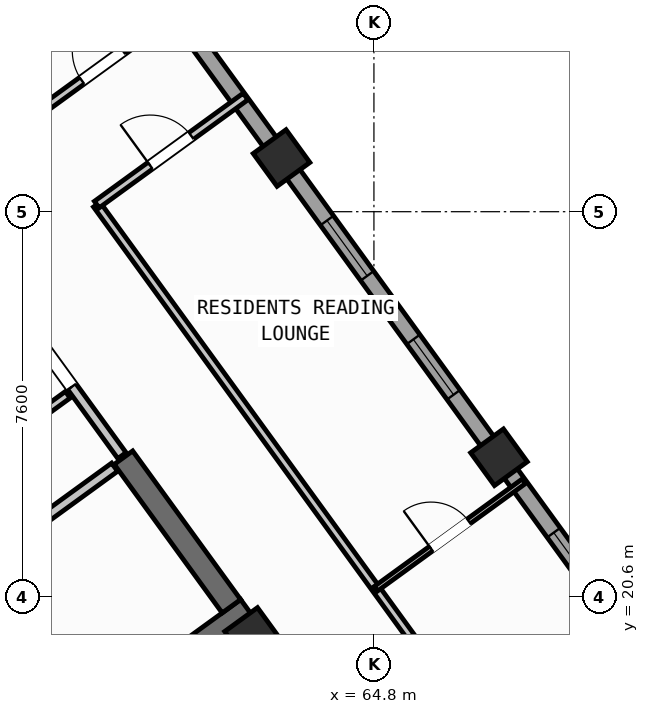
"""IFC4 building model, lengths in metres.
Left out: names, types, materials, properties, quantities, classifications, styles, units other than length and angle.
Written with IfcOpenShell. Run it as: python <this file> out.ifc"""

import sys

from ifc_helpers import new_model, si_unit, direction, frame, frame_2d, origin, origin_2d, place, context, subcontext, project, spatial, rectangle, hollow_rectangle, extrude, source, transform, mapped, element, fill, save


model = new_model("IFC4")
c1 = context("Model", 3, precision=1e-05, world=origin(), true_north=direction((0.0, 1.0)))
c2 = subcontext(c1, "Body", "Model", "MODEL_VIEW")
j1 = project(units=[si_unit("LENGTHUNIT", "METRE"), si_unit("PLANEANGLEUNIT", "RADIAN")], contexts=[c1])
p1 = place(None, origin())
s1 = spatial("IfcSite", under=j1, at=p1, CompositionType="ELEMENT")
p2 = place(p1, origin())
s2 = spatial("IfcBuilding", under=s1, at=p2, CompositionType="ELEMENT")
p3 = place(p2, frame((0.0, 0.0, 238.5)))
s3 = spatial("IfcBuildingStorey", under=s2, at=p3, CompositionType="ELEMENT", Elevation=238.5)
p4 = place(p3, frame((52.399, 13.169, 0.0), z_axis=(0.0, 0.0, 1.0), x_axis=(0.809022352778, 0.587777877013, 0.0)))
e1 = element("IfcWall", 1, at=p4, inside=s3, PredefinedType="SHEAR", context=c2, shape_type="SweptSolid", body=[
    extrude(rectangle(XDim=12.24, YDim=0.45, at=frame_2d((6.12, 0.0))), origin(), (0.0, 0.0, 1.0), 3.35),
])
p5 = place(p3, frame((61.988, 20.413, 0.0), z_axis=(0.0, 0.0, 1.0), x_axis=(-0.587819244441, 0.808992296542, 0.0)))
e2 = element("IfcWall", 2, at=p5, inside=s3, PredefinedType="SHEAR", context=c2, shape_type="SweptSolid", body=[
    extrude(rectangle(XDim=3.625, YDim=0.45, at=frame_2d((1.812, 0.0))), origin(), (0.0, 0.0, 1.0), 3.35),
])
m1 = source(origin(), c2, "Body", "SweptSolid", [
    extrude(hollow_rectangle(XDim=0.8, YDim=0.8, WallThickness=0.032, at=origin_2d()), origin(), (0.0, 0.0, 1.0), 3.6),
])
for number, where, z_axis, x_axis in (
    (3, (62.414, 19.827, 0.0), (0.0, 0.0, 1.0), (0.809, 0.588, 0.0)),
    (4, (67.268, 23.354, 0.0), (0.0, 0.0, 1.0), (0.809, 0.588, 0.0)),
    (5, (62.977, 29.259, 0.0), (0.0, 0.0, 1.0), (0.809, 0.588, 0.0)),
):
    element("IfcColumn", number, at=place(p3, frame(where, z_axis=z_axis, x_axis=x_axis)), inside=s3, PredefinedType="COLUMN", context=c2, shape_type="MappedRepresentation", body=[
        mapped(m1, transform((0.0, 0.0, 0.0), scale=1.0)),
    ])
p6 = place(p3, frame((58.455, 35.484, 0.0), z_axis=(0.0, 0.0, 1.0), x_axis=(0.587783625747, -0.809018176127, 0.0)))
e6 = element("IfcWall", 6, at=p6, inside=s3, PredefinedType="STANDARD", context=c2, shape_type="SweptSolid", body=[
    extrude(rectangle(XDim=21.587, YDim=0.32, at=frame_2d((10.794, 0.0))), origin(), (0.0, 0.0, 1.0), 2.875),
])
p7 = place(p6, frame((1.554, 0.0, 0.9)))
e7 = element("IfcOpeningElement", 7, at=p7, cuts=e6, PredefinedType="OPENING", context=c2, shape_type="SweptSolid", body=[
    extrude(rectangle(XDim=1.65, YDim=1.45, at=frame_2d((0.825, 0.725))), frame((0.0, 0.17, 0.0), z_axis=(0.0, -1.0, 0.0), x_axis=(1.0, 0.0, 0.0)), (0.0, 0.0, 1.0), 0.34),
])
p8 = place(p6, frame((9.219, 0.0, 0.9)))
e8 = element("IfcOpeningElement", 8, at=p8, cuts=e6, PredefinedType="OPENING", context=c2, shape_type="SweptSolid", body=[
    extrude(rectangle(XDim=1.35, YDim=1.45, at=frame_2d((0.675, 0.725))), frame((0.0, 0.17, 0.0), z_axis=(0.0, -1.0, 0.0), x_axis=(1.0, 0.0, 0.0)), (0.0, 0.0, 1.0), 0.34),
])
p9 = place(p6, frame((12.119, 0.0, 0.9)))
e9 = element("IfcOpeningElement", 9, at=p9, cuts=e6, PredefinedType="OPENING", context=c2, shape_type="SweptSolid", body=[
    extrude(rectangle(XDim=1.35, YDim=1.45, at=frame_2d((0.675, 0.725))), frame((0.0, 0.17, 0.0), z_axis=(0.0, -1.0, 0.0), x_axis=(1.0, 0.0, 0.0)), (0.0, 0.0, 1.0), 0.34),
])
p10 = place(p6, frame((16.833, 0.0, 1.0)))
e10 = element("IfcOpeningElement", 10, at=p10, cuts=e6, PredefinedType="OPENING", context=c2, shape_type="SweptSolid", body=[
    extrude(rectangle(XDim=0.9, YDim=1.25, at=frame_2d((0.45, 0.625))), frame((0.0, 0.17, 0.0), z_axis=(0.0, -1.0, 0.0), x_axis=(1.0, 0.0, 0.0)), (0.0, 0.0, 1.0), 0.34),
])
p11 = place(p6, frame((19.057, 0.0, 1.0)))
e11 = element("IfcOpeningElement", 11, at=p11, cuts=e6, PredefinedType="OPENING", context=c2, shape_type="SweptSolid", body=[
    extrude(rectangle(XDim=0.9, YDim=1.25, at=frame_2d((0.45, 0.625))), frame((0.0, 0.17, 0.0), z_axis=(0.0, -1.0, 0.0), x_axis=(1.0, 0.0, 0.0)), (0.0, 0.0, 1.0), 0.34),
])
p12 = place(p3, frame((58.41, 18.327, 0.0), z_axis=(0.0, 0.0, 1.0), x_axis=(-0.58776738483, 0.809029975545, 0.0)))
e12 = element("IfcWall", 12, at=p12, inside=s3, PredefinedType="SHEAR", context=c2, shape_type="SweptSolid", body=[
    extrude(rectangle(XDim=3.16, YDim=0.26, at=frame_2d((1.58, 0.0))), origin(), (0.0, 0.0, 1.0), 3.35),
])
p13 = place(p3, frame((56.553, 20.884, 0.0), z_axis=(0.0, 0.0, 1.0), x_axis=(0.809041669066, 0.587751288995, 0.0)))
e13 = element("IfcWall", 13, at=p13, inside=s3, PredefinedType="STANDARD", context=c2, shape_type="SweptSolid", body=[
    extrude(rectangle(XDim=3.868, YDim=0.2, at=frame_2d((1.934, 0.0))), origin(), (0.0, 0.0, 1.0), 3.34),
])
p14 = place(p13, frame((0.55, 0.0, 0.0)))
e14 = element("IfcOpeningElement", 14, at=p14, cuts=e13, PredefinedType="OPENING", context=c2, shape_type="SweptSolid", body=[
    extrude(rectangle(XDim=0.86, YDim=2.05, at=frame_2d((0.43, 1.025))), frame((0.0, 0.11, 0.0), z_axis=(0.0, -1.0, 0.0), x_axis=(1.0, 0.0, 0.0)), (0.0, 0.0, 1.0), 0.22),
])
p15 = place(p3, frame((54.421, 21.436, 0.0), z_axis=(0.0, 0.0, 1.0), x_axis=(0.809013710463, 0.587789772183, 0.0)))
e15 = element("IfcWall", 15, at=p15, inside=s3, PredefinedType="PARTITIONING", context=c2, shape_type="SweptSolid", body=[
    extrude(rectangle(XDim=5.36, YDim=0.16, at=frame_2d((2.68, 0.0))), origin(), (0.0, 0.0, 1.0), 3.34),
])
p16 = place(p15, frame((1.4, 0.0, 0.0)))
e16 = element("IfcOpeningElement", 16, at=p16, cuts=e15, PredefinedType="OPENING", context=c2, shape_type="SweptSolid", body=[
    extrude(rectangle(XDim=0.86, YDim=2.05, at=frame_2d((0.43, 1.025))), frame((0.0, 0.09, 0.0), z_axis=(0.0, -1.0, 0.0), x_axis=(1.0, 0.0, 0.0)), (0.0, 0.0, 1.0), 0.18),
])
p17 = place(p3, frame((59.827, 23.386, 0.0), z_axis=(0.0, 0.0, 1.0), x_axis=(-0.587803840107, 0.809003489211, 0.0)))
e17 = element("IfcWall", 17, at=p17, inside=s3, PredefinedType="STANDARD", context=c2, shape_type="SweptSolid", body=[
    extrude(rectangle(XDim=2.96, YDim=0.2, at=frame_2d((1.48, 0.0))), origin(), (0.0, 0.0, 1.0), 3.34),
])
p18 = place(p17, frame((1.68, 0.0, 0.0)))
e18 = element("IfcOpeningElement", 18, at=p18, cuts=e17, PredefinedType="OPENING", context=c2, shape_type="SweptSolid", body=[
    extrude(rectangle(XDim=1.0, YDim=2.1, at=frame_2d((0.5, 1.05))), frame((0.0, 0.11, 0.0), z_axis=(0.0, -1.0, 0.0), x_axis=(1.0, 0.0, 0.0)), (0.0, 0.0, 1.0), 0.22),
])
p19 = place(p3, frame((63.507, 18.322, 0.0), z_axis=(0.0, 0.0, 1.0), x_axis=(0.809034604122, 0.587761013791, 0.0)))
e19 = element("IfcWall", 19, at=p19, inside=s3, PredefinedType="PARTITIONING", context=c2, shape_type="SweptSolid", body=[
    extrude(rectangle(XDim=2.51, YDim=0.16, at=frame_2d((1.255, 0.0))), origin(), (0.0, 0.0, 1.0), 3.34),
])
p20 = place(p3, frame((68.353, 15.922, 0.0), z_axis=(0.0, 0.0, 1.0), x_axis=(-0.587782002009, 0.809019355834, 0.0)))
e20 = element("IfcWall", 20, at=p20, inside=s3, PredefinedType="PARTITIONING", context=c2, shape_type="SweptSolid", body=[
    extrude(rectangle(XDim=15.35, YDim=0.16, at=frame_2d((7.675, 0.0))), origin(), (0.0, 0.0, 1.0), 3.34),
])
p21 = place(p3, frame((59.331, 28.341, 0.0), z_axis=(0.0, 0.0, 1.0), x_axis=(0.809003564202, 0.587803736896, 0.0)))
e21 = element("IfcWall", 21, at=p21, inside=s3, PredefinedType="PARTITIONING", context=c2, shape_type="SweptSolid", body=[
    extrude(rectangle(XDim=3.63, YDim=0.16, at=frame_2d((1.815, 0.0))), origin(), (0.0, 0.0, 1.0), 3.34),
])
p22 = place(p21, frame((1.305, 0.0, 0.0)))
e22 = element("IfcOpeningElement", 22, at=p22, cuts=e21, PredefinedType="OPENING", context=c2, shape_type="SweptSolid", body=[
    extrude(rectangle(XDim=1.0, YDim=2.1, at=frame_2d((0.5, 1.05))), frame((0.0, 0.09, 0.0), z_axis=(0.0, -1.0, 0.0), x_axis=(1.0, 0.0, 0.0)), (0.0, 0.0, 1.0), 0.18),
])
p23 = place(p3, frame((58.067, 30.08, 0.0), z_axis=(0.0, 0.0, 1.0), x_axis=(0.809012309495, 0.587791700422, 0.0)))
e23 = element("IfcWall", 23, at=p23, inside=s3, PredefinedType="PARTITIONING", context=c2, shape_type="SweptSolid", body=[
    extrude(rectangle(XDim=3.63, YDim=0.16, at=frame_2d((1.815, 0.0))), origin(), (0.0, 0.0, 1.0), 3.34),
])
p24 = place(p23, frame((1.2, 0.0, 0.0)))
e24 = element("IfcOpeningElement", 24, at=p24, cuts=e23, PredefinedType="OPENING", context=c2, shape_type="SweptSolid", body=[
    extrude(rectangle(XDim=1.0, YDim=2.1, at=frame_2d((0.5, 1.05))), frame((0.0, 0.09, 0.0), z_axis=(0.0, -1.0, 0.0), x_axis=(1.0, 0.0, 0.0)), (0.0, 0.0, 1.0), 0.18),
])
p25 = place(p3, frame((64.839, 20.759, 0.0), z_axis=(0.0, 0.0, 1.0), x_axis=(0.809013833588, 0.587789602718, 0.0)))
e25 = element("IfcWall", 25, at=p25, inside=s3, PredefinedType="PARTITIONING", context=c2, shape_type="SweptSolid", body=[
    extrude(rectangle(XDim=3.61, YDim=0.11, at=frame_2d((1.805, 0.0))), origin(), (0.0, 0.0, 1.0), 3.34),
])
p26 = place(p25, frame((1.345, 0.0, 0.0)))
e26 = element("IfcOpeningElement", 26, at=p26, cuts=e25, PredefinedType="OPENING", context=c2, shape_type="SweptSolid", body=[
    extrude(rectangle(XDim=0.92, YDim=2.08, at=frame_2d((0.46, 1.04))), frame((0.0, 0.065, 0.0), z_axis=(0.0, -1.0, 0.0), x_axis=(1.0, 0.0, 0.0)), (0.0, 0.0, 1.0), 0.13),
])
m2 = source(origin(), c2, "Body", "SweptSolid", [
    extrude(rectangle(XDim=1.35, YDim=1.45, at=frame_2d((0.675, 0.725))), frame((0.0, 0.03, 0.0), z_axis=(0.0, -1.0, 0.0), x_axis=(1.0, 0.0, 0.0)), (0.0, 0.0, 1.0), 0.06),
])
p27 = place(p8, origin())
e27 = element("IfcWindow", 27, at=p27, inside=s3, PartitioningType="SINGLE_PANEL", PredefinedType="WINDOW", context=c2, shape_type="MappedRepresentation", body=[
    mapped(m2, transform((0.0, 0.0, 0.0), scale=1.0)),
])
fill(e8, e27)
p28 = place(p9, origin())
e28 = element("IfcWindow", 28, at=p28, inside=s3, PartitioningType="SINGLE_PANEL", PredefinedType="WINDOW", context=c2, shape_type="MappedRepresentation", body=[
    mapped(m2, transform((0.0, 0.0, 0.0), scale=1.0)),
])
fill(e9, e28)
m3 = source(origin(), c2, "Body", "SweptSolid", [
    extrude(rectangle(XDim=0.9, YDim=1.25, at=frame_2d((0.45, 0.625))), frame((0.0, 0.03, 0.0), z_axis=(0.0, -1.0, 0.0), x_axis=(1.0, 0.0, 0.0)), (0.0, 0.0, 1.0), 0.06),
])
p29 = place(p10, origin())
e29 = element("IfcWindow", 29, at=p29, inside=s3, PartitioningType="SINGLE_PANEL", PredefinedType="WINDOW", context=c2, shape_type="MappedRepresentation", body=[
    mapped(m3, transform((0.0, 0.0, 0.0), scale=1.0)),
])
fill(e10, e29)
m4 = source(origin(), c2, "Body", "SweptSolid", [
    extrude(rectangle(XDim=1.0, YDim=2.1, at=frame_2d((0.5, 1.05))), frame((0.0, 0.025, 0.0), z_axis=(0.0, -1.0, 0.0), x_axis=(1.0, 0.0, 0.0)), (0.0, 0.0, 1.0), 0.05),
])
p30 = place(p18, origin())
e30 = element("IfcDoor", 30, at=p30, inside=s3, OperationType="SINGLE_SWING_LEFT", PredefinedType="DOOR", context=c2, shape_type="MappedRepresentation", body=[
    mapped(m4, transform((0.0, 0.0, 0.0), scale=1.0)),
])
fill(e18, e30)
p31 = place(p24, origin())
e31 = element("IfcDoor", 31, at=p31, inside=s3, OperationType="SINGLE_SWING_RIGHT", PredefinedType="DOOR", context=c2, shape_type="MappedRepresentation", body=[
    mapped(m4, transform((0.0, 0.0, 0.0), scale=1.0)),
])
fill(e24, e31)
p32 = place(p22, origin())
e32 = element("IfcDoor", 32, at=p32, inside=s3, OperationType="SINGLE_SWING_LEFT", PredefinedType="DOOR", context=c2, shape_type="MappedRepresentation", body=[
    mapped(m4, transform((0.0, 0.0, 0.0), scale=1.0)),
])
fill(e22, e32)
m5 = source(origin(), c2, "Body", "SweptSolid", [
    extrude(rectangle(XDim=0.92, YDim=2.08, at=frame_2d((0.46, 1.04))), frame((0.0, 0.025, 0.0), z_axis=(0.0, -1.0, 0.0), x_axis=(1.0, 0.0, 0.0)), (0.0, 0.0, 1.0), 0.05),
])
p33 = place(p26, origin())
e33 = element("IfcDoor", 33, at=p33, inside=s3, OperationType="SINGLE_SWING_LEFT", PredefinedType="DOOR", context=c2, shape_type="MappedRepresentation", body=[
    mapped(m5, transform((0.0, 0.0, 0.0), scale=1.0)),
])
fill(e26, e33)
save(model, sys.argv[1])
